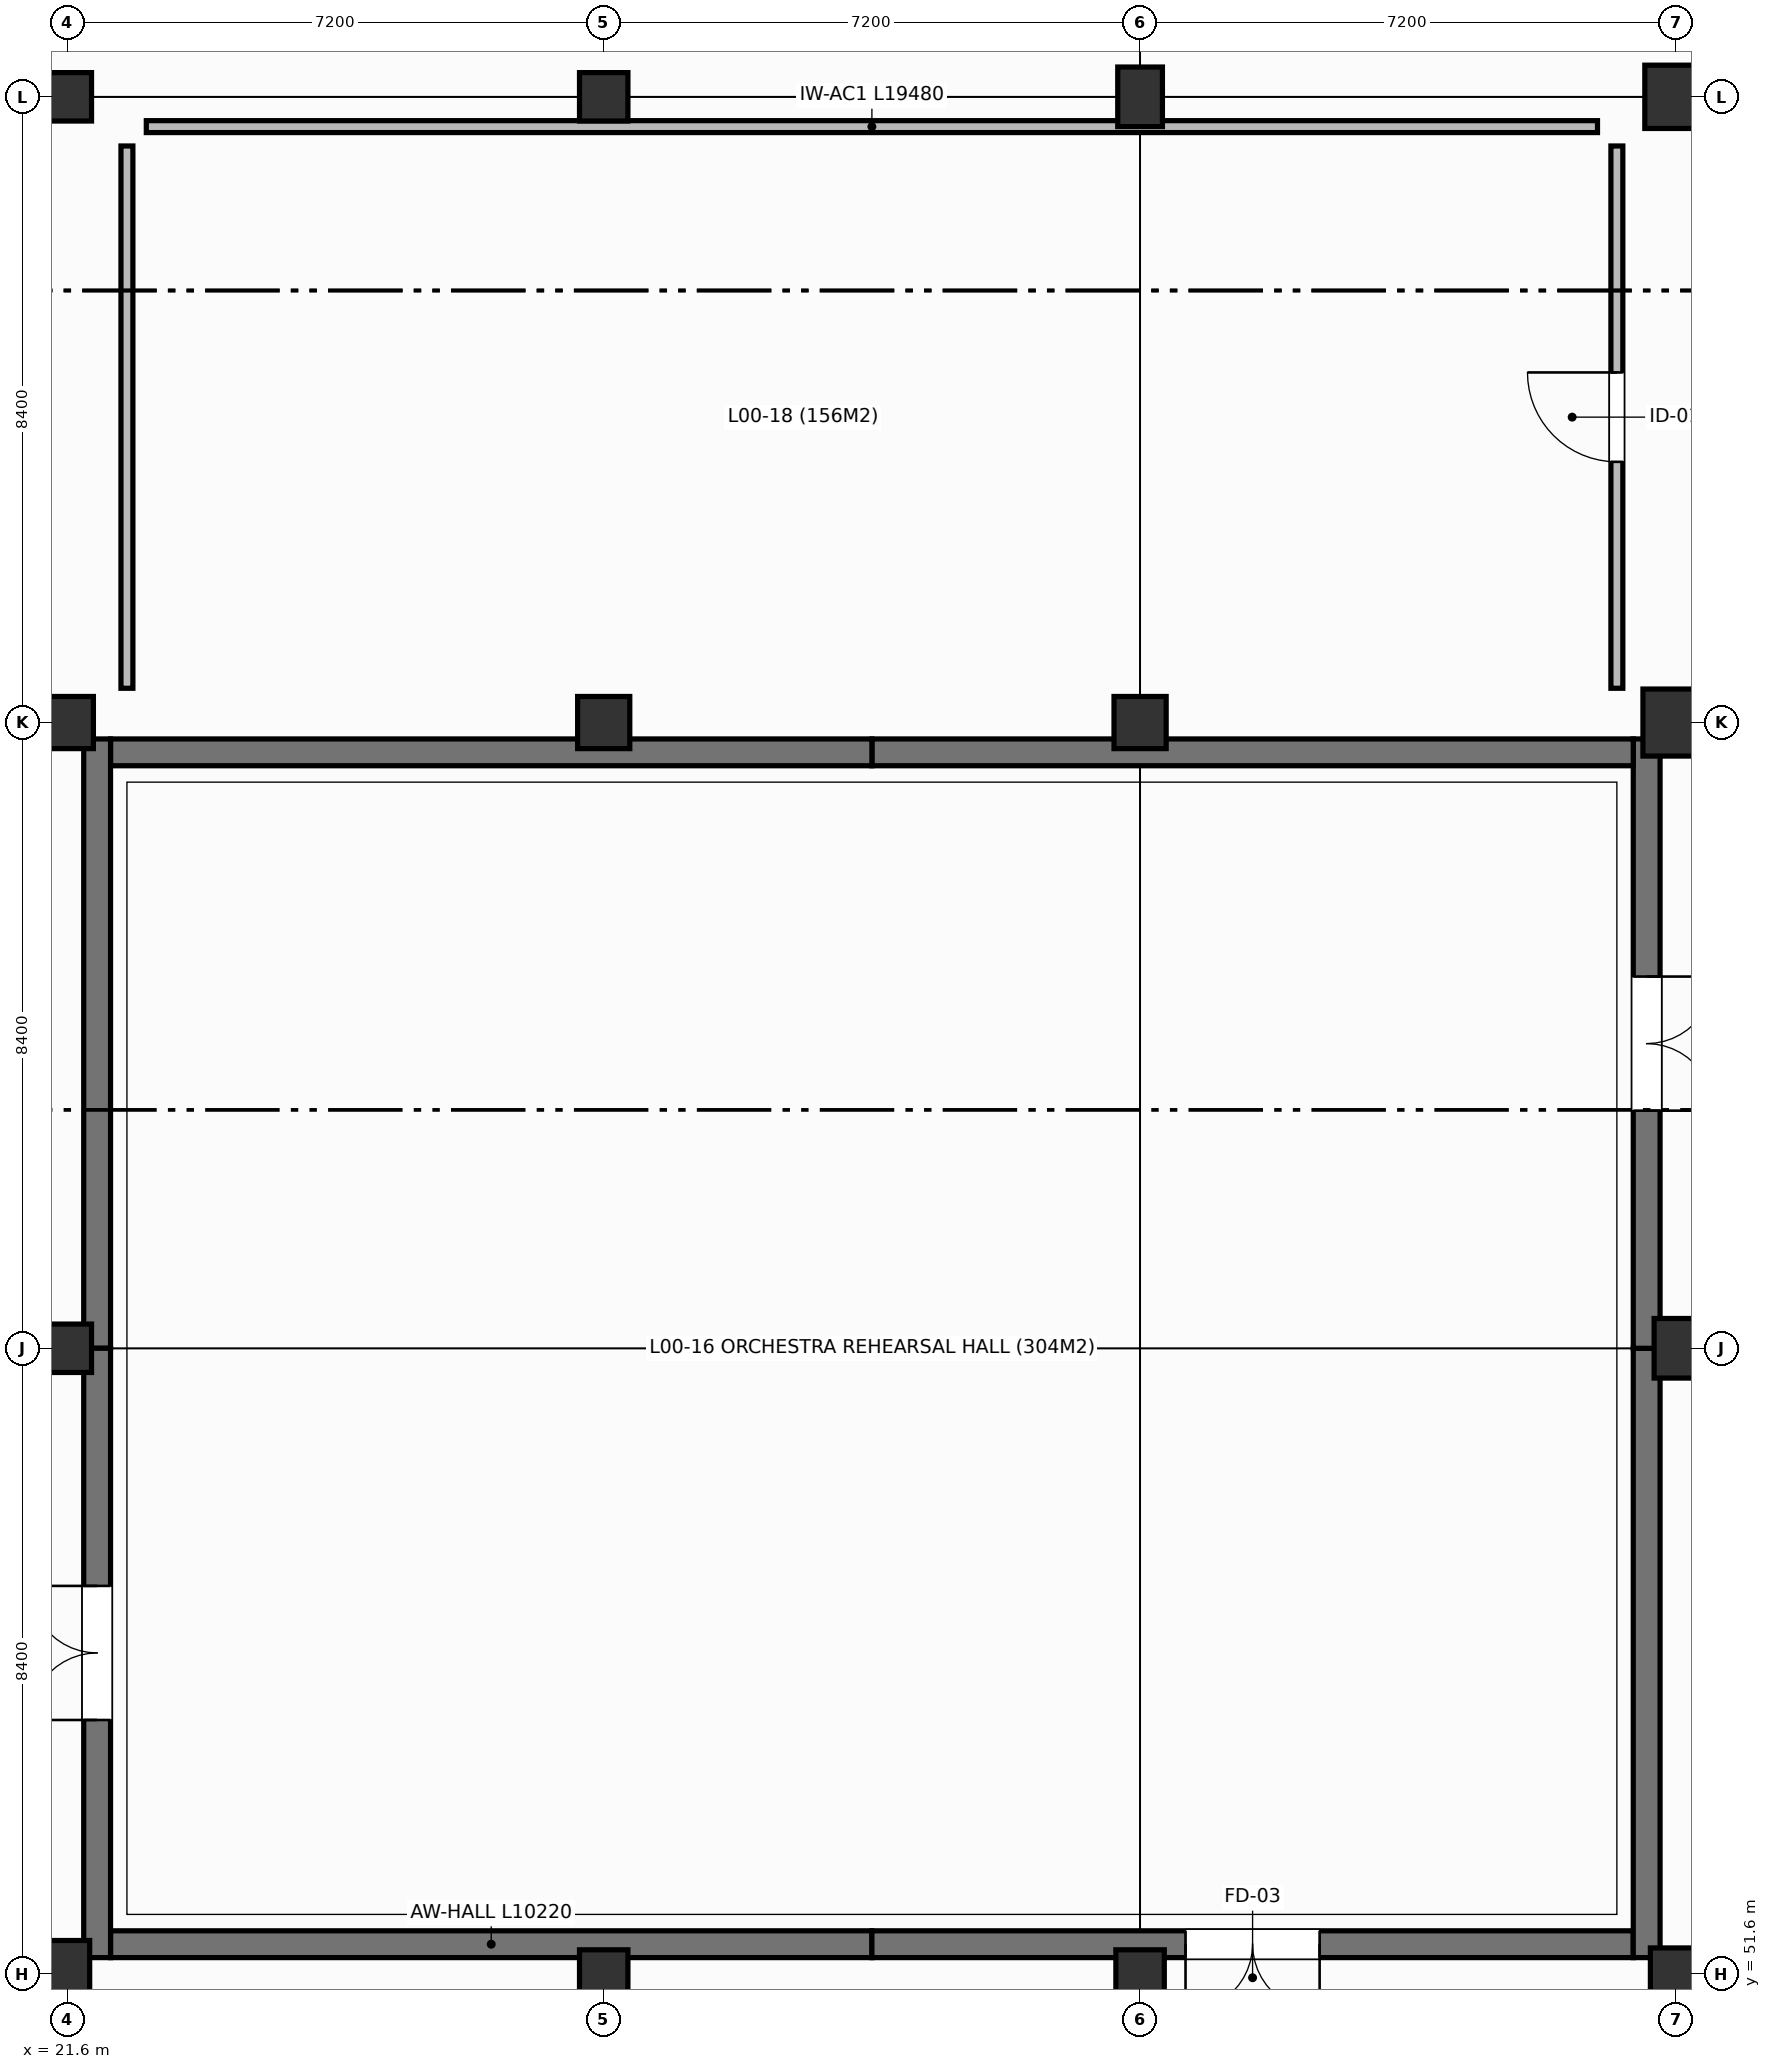
"""IFC4 building model, lengths in metres.
Left out: names, types, materials, properties, quantities, classifications, styles, units other than length and angle.
Written with IfcOpenShell. Run it as: python <this file> out.ifc"""

import sys

from ifc_helpers import new_model, si_unit, direction, frame, frame_2d, origin, origin_2d, place, context, subcontext, project, spatial, rectangle, extrude, element, fill, save


model = new_model("IFC4")
c1 = context("Model", 3, precision=1e-05, world=origin(), true_north=direction((0.0, 1.0)))
c2 = subcontext(c1, "Body", "Model", "MODEL_VIEW")
j1 = project(units=[si_unit("LENGTHUNIT", "METRE"), si_unit("PLANEANGLEUNIT", "RADIAN")], contexts=[c1])
p1 = place(None, origin())
s1 = spatial("IfcSite", under=j1, at=p1, CompositionType="ELEMENT")
p2 = place(p1, origin())
s2 = spatial("IfcBuilding", under=s1, at=p2, CompositionType="ELEMENT")
p3 = place(p2, origin())
s3 = spatial("IfcBuildingStorey", under=s2, at=p3, CompositionType="ELEMENT", Elevation=0.0)
p4 = place(p3, frame((21.6, 51.6, 0.0), z_axis=(0.0, 0.0, 1.0), x_axis=(1.0, 0.0, 0.0)))
e1 = element("IfcColumn", 1, at=p4, inside=s3, PredefinedType="COLUMN", context=c2, shape_type="SweptSolid", body=[
    extrude(rectangle(XDim=0.6, YDim=0.9, at=origin_2d()), origin(), (0.0, 0.0, 1.0), 4.8),
])
p5 = place(p3, frame((21.6, 60.0, 0.0), z_axis=(0.0, 0.0, 1.0), x_axis=(1.0, 0.0, 0.0)))
e2 = element("IfcColumn", 2, at=p5, inside=s3, PredefinedType="COLUMN", context=c2, shape_type="SweptSolid", body=[
    extrude(rectangle(XDim=0.65, YDim=0.65, at=origin_2d()), origin(), (0.0, 0.0, 1.0), 4.8),
])
p6 = place(p3, frame((21.6, 68.4, 0.0), z_axis=(0.0, 0.0, 1.0), x_axis=(1.0, 0.0, 0.0)))
e3 = element("IfcColumn", 3, at=p6, inside=s3, PredefinedType="COLUMN", context=c2, shape_type="SweptSolid", body=[
    extrude(rectangle(XDim=0.7, YDim=0.7, at=origin_2d()), origin(), (0.0, 0.0, 1.0), 4.8),
])
for number, where, z_axis, x_axis in (
    (4, (21.6, 76.8, 0.0), (0.0, 0.0, 1.0), (1.0, 0.0, 0.0)),
    (5, (28.8, 51.6, 0.0), (0.0, 0.0, 1.0), (1.0, 0.0, 0.0)),
):
    element("IfcColumn", number, at=place(p3, frame(where, z_axis=z_axis, x_axis=x_axis)), inside=s3, PredefinedType="COLUMN", context=c2, shape_type="SweptSolid", body=[
        extrude(rectangle(XDim=0.65, YDim=0.65, at=origin_2d()), origin(), (0.0, 0.0, 1.0), 4.8),
    ])
p7 = place(p3, frame((28.8, 68.4, 0.0), z_axis=(0.0, 0.0, 1.0), x_axis=(1.0, 0.0, 0.0)))
e6 = element("IfcColumn", 6, at=p7, inside=s3, PredefinedType="COLUMN", context=c2, shape_type="SweptSolid", body=[
    extrude(rectangle(XDim=0.7, YDim=0.7, at=origin_2d()), origin(), (0.0, 0.0, 1.0), 4.8),
])
for number, where, z_axis, x_axis in (
    (7, (28.8, 76.8, 0.0), (0.0, 0.0, 1.0), (1.0, 0.0, 0.0)),
    (8, (36.0, 51.6, 0.0), (0.0, 0.0, 1.0), (1.0, 0.0, 0.0)),
):
    element("IfcColumn", number, at=place(p3, frame(where, z_axis=z_axis, x_axis=x_axis)), inside=s3, PredefinedType="COLUMN", context=c2, shape_type="SweptSolid", body=[
        extrude(rectangle(XDim=0.65, YDim=0.65, at=origin_2d()), origin(), (0.0, 0.0, 1.0), 4.8),
    ])
p8 = place(p3, frame((36.0, 68.4, 0.0), z_axis=(0.0, 0.0, 1.0), x_axis=(1.0, 0.0, 0.0)))
e9 = element("IfcColumn", 9, at=p8, inside=s3, PredefinedType="COLUMN", context=c2, shape_type="SweptSolid", body=[
    extrude(rectangle(XDim=0.7, YDim=0.7, at=origin_2d()), origin(), (0.0, 0.0, 1.0), 4.8),
])
p9 = place(p3, frame((36.0, 76.8, 0.0), z_axis=(0.0, 0.0, 1.0), x_axis=(1.0, 0.0, 0.0)))
e10 = element("IfcColumn", 10, at=p9, inside=s3, PredefinedType="COLUMN", context=c2, shape_type="SweptSolid", body=[
    extrude(rectangle(XDim=0.6, YDim=0.8, at=origin_2d()), origin(), (0.0, 0.0, 1.0), 4.8),
])
p10 = place(p3, frame((43.2, 51.6, 0.0), z_axis=(0.0, 0.0, 1.0), x_axis=(1.0, 0.0, 0.0)))
e11 = element("IfcColumn", 11, at=p10, inside=s3, PredefinedType="COLUMN", context=c2, shape_type="SweptSolid", body=[
    extrude(rectangle(XDim=0.7, YDim=0.7, at=origin_2d()), origin(), (0.0, 0.0, 1.0), 4.8),
])
p11 = place(p3, frame((43.2, 60.0, 0.0), z_axis=(0.0, 0.0, 1.0), x_axis=(1.0, 0.0, 0.0)))
e12 = element("IfcColumn", 12, at=p11, inside=s3, PredefinedType="COLUMN", context=c2, shape_type="SweptSolid", body=[
    extrude(rectangle(XDim=0.6, YDim=0.8, at=origin_2d()), origin(), (0.0, 0.0, 1.0), 4.8),
])
p12 = place(p3, frame((43.2, 68.4, 0.0), z_axis=(0.0, 0.0, 1.0), x_axis=(1.0, 0.0, 0.0)))
e13 = element("IfcColumn", 13, at=p12, inside=s3, PredefinedType="COLUMN", context=c2, shape_type="SweptSolid", body=[
    extrude(rectangle(XDim=0.9, YDim=0.9, at=origin_2d()), origin(), (0.0, 0.0, 1.0), 4.8),
])
p13 = place(p3, frame((43.2, 76.8, 0.0), z_axis=(0.0, 0.0, 1.0), x_axis=(1.0, 0.0, 0.0)))
e14 = element("IfcColumn", 14, at=p13, inside=s3, PredefinedType="COLUMN", context=c2, shape_type="SweptSolid", body=[
    extrude(rectangle(XDim=0.85, YDim=0.85, at=origin_2d()), origin(), (0.0, 0.0, 1.0), 4.8),
])
p14 = place(p3, frame((22.18, 52.0, 0.0), z_axis=(0.0, 0.0, 1.0), x_axis=(1.0, 0.0, 0.0)))
e15 = element("IfcWall", 15, at=p14, inside=s3, PredefinedType="SHEAR", context=c2, shape_type="SweptSolid", body=[
    extrude(rectangle(XDim=10.22, YDim=0.36, at=frame_2d((5.11, 0.0))), origin(), (0.0, 0.0, 1.0), 4.8),
])
p15 = place(p3, frame((32.4, 52.0, 0.0), z_axis=(0.0, 0.0, 1.0), x_axis=(1.0, 0.0, 0.0)))
e16 = element("IfcWall", 16, at=p15, inside=s3, PredefinedType="SHEAR", context=c2, shape_type="SweptSolid", body=[
    extrude(rectangle(XDim=10.22, YDim=0.36, at=frame_2d((5.11, 0.0))), origin(), (0.0, 0.0, 1.0), 4.8),
])
p16 = place(p15, frame((4.21, 0.0, 0.0)))
e17 = element("IfcOpeningElement", 17, at=p16, cuts=e16, PredefinedType="OPENING", context=c2, shape_type="SweptSolid", body=[
    extrude(rectangle(XDim=1.8, YDim=2.25, at=frame_2d((0.9, 1.125))), frame((0.0, 0.19, 0.0), z_axis=(0.0, -1.0, 0.0), x_axis=(1.0, 0.0, 0.0)), (0.0, 0.0, 1.0), 0.38),
])
p17 = place(p3, frame((42.8, 51.82, 0.0), z_axis=(0.0, 0.0, 1.0), x_axis=(0.0, 1.0, 0.0)))
e18 = element("IfcWall", 18, at=p17, inside=s3, PredefinedType="SHEAR", context=c2, shape_type="SweptSolid", body=[
    extrude(rectangle(XDim=8.18, YDim=0.36, at=frame_2d((4.09, 0.0))), origin(), (0.0, 0.0, 1.0), 4.8),
])
p18 = place(p3, frame((42.8, 60.0, 0.0), z_axis=(0.0, 0.0, 1.0), x_axis=(0.0, 1.0, 0.0)))
e19 = element("IfcWall", 19, at=p18, inside=s3, PredefinedType="SHEAR", context=c2, shape_type="SweptSolid", body=[
    extrude(rectangle(XDim=8.18, YDim=0.36, at=frame_2d((4.09, 0.0))), origin(), (0.0, 0.0, 1.0), 4.8),
])
p19 = place(p18, frame((3.19, 0.0, 0.0)))
e20 = element("IfcOpeningElement", 20, at=p19, cuts=e19, PredefinedType="OPENING", context=c2, shape_type="SweptSolid", body=[
    extrude(rectangle(XDim=1.8, YDim=2.25, at=frame_2d((0.9, 1.125))), frame((0.0, 0.19, 0.0), z_axis=(0.0, -1.0, 0.0), x_axis=(1.0, 0.0, 0.0)), (0.0, 0.0, 1.0), 0.38),
])
p20 = place(p3, frame((42.62, 68.0, 0.0), z_axis=(0.0, 0.0, 1.0), x_axis=(-1.0, 0.0, 0.0)))
e21 = element("IfcWall", 21, at=p20, inside=s3, PredefinedType="SHEAR", context=c2, shape_type="SweptSolid", body=[
    extrude(rectangle(XDim=10.22, YDim=0.36, at=frame_2d((5.11, 0.0))), origin(), (0.0, 0.0, 1.0), 4.8),
])
p21 = place(p3, frame((32.4, 68.0, 0.0), z_axis=(0.0, 0.0, 1.0), x_axis=(-1.0, 0.0, 0.0)))
e22 = element("IfcWall", 22, at=p21, inside=s3, PredefinedType="SHEAR", context=c2, shape_type="SweptSolid", body=[
    extrude(rectangle(XDim=10.22, YDim=0.36, at=frame_2d((5.11, 0.0))), origin(), (0.0, 0.0, 1.0), 4.8),
])
p22 = place(p3, frame((22.0, 68.18, 0.0), z_axis=(0.0, 0.0, 1.0), x_axis=(0.0, -1.0, 0.0)))
e23 = element("IfcWall", 23, at=p22, inside=s3, PredefinedType="SHEAR", context=c2, shape_type="SweptSolid", body=[
    extrude(rectangle(XDim=8.18, YDim=0.36, at=frame_2d((4.09, 0.0))), origin(), (0.0, 0.0, 1.0), 4.8),
])
p23 = place(p3, frame((22.0, 60.0, 0.0), z_axis=(0.0, 0.0, 1.0), x_axis=(0.0, -1.0, 0.0)))
e24 = element("IfcWall", 24, at=p23, inside=s3, PredefinedType="SHEAR", context=c2, shape_type="SweptSolid", body=[
    extrude(rectangle(XDim=8.18, YDim=0.36, at=frame_2d((4.09, 0.0))), origin(), (0.0, 0.0, 1.0), 4.8),
])
p24 = place(p23, frame((3.19, 0.0, 0.0)))
e25 = element("IfcOpeningElement", 25, at=p24, cuts=e24, PredefinedType="OPENING", context=c2, shape_type="SweptSolid", body=[
    extrude(rectangle(XDim=1.8, YDim=2.25, at=frame_2d((0.9, 1.125))), frame((0.0, 0.19, 0.0), z_axis=(0.0, -1.0, 0.0), x_axis=(1.0, 0.0, 0.0)), (0.0, 0.0, 1.0), 0.38),
])
p25 = place(p3, frame((42.4, 68.86, 0.0), z_axis=(0.0, 0.0, 1.0), x_axis=(0.0, 1.0, 0.0)))
e26 = element("IfcWall", 26, at=p25, inside=s3, PredefinedType="PARTITIONING", context=c2, shape_type="SweptSolid", body=[
    extrude(rectangle(XDim=7.28, YDim=0.16, at=frame_2d((3.64, 0.0))), origin(), (0.0, 0.0, 1.0), 4.44),
])
p26 = place(p25, frame((3.04, 0.0, 0.0)))
e27 = element("IfcOpeningElement", 27, at=p26, cuts=e26, PredefinedType="OPENING", context=c2, shape_type="SweptSolid", body=[
    extrude(rectangle(XDim=1.2, YDim=2.15, at=frame_2d((0.6, 1.075))), frame((0.0, 0.09, 0.0), z_axis=(0.0, -1.0, 0.0), x_axis=(1.0, 0.0, 0.0)), (0.0, 0.0, 1.0), 0.18),
])
p27 = place(p3, frame((42.14, 76.4, 0.0), z_axis=(0.0, 0.0, 1.0), x_axis=(-1.0, 0.0, 0.0)))
e28 = element("IfcWall", 28, at=p27, inside=s3, PredefinedType="PARTITIONING", context=c2, shape_type="SweptSolid", body=[
    extrude(rectangle(XDim=19.48, YDim=0.16, at=frame_2d((9.74, 0.0))), origin(), (0.0, 0.0, 1.0), 3.615),
])
p28 = place(p3, frame((22.4, 76.14, 0.0), z_axis=(0.0, 0.0, 1.0), x_axis=(0.0, -1.0, 0.0)))
e29 = element("IfcWall", 29, at=p28, inside=s3, PredefinedType="PARTITIONING", context=c2, shape_type="SweptSolid", body=[
    extrude(rectangle(XDim=7.28, YDim=0.16, at=frame_2d((3.64, 0.0))), origin(), (0.0, 0.0, 1.0), 4.44),
])
p29 = place(p16, frame((1.8, 0.0, 0.0), z_axis=(0.0, 0.0, 1.0), x_axis=(-1.0, 0.0, 0.0)))
e30 = element("IfcDoor", 30, at=p29, inside=s3, OperationType="DOUBLE_DOOR_SINGLE_SWING", PredefinedType="DOOR", context=c2, shape_type="SweptSolid", body=[
    extrude(rectangle(XDim=1.8, YDim=2.25, at=frame_2d((0.9, 1.125))), frame((0.0, 0.025, 0.0), z_axis=(0.0, -1.0, 0.0), x_axis=(1.0, 0.0, 0.0)), (0.0, 0.0, 1.0), 0.05),
])
fill(e17, e30)
p30 = place(p19, frame((1.8, 0.0, 0.0), z_axis=(0.0, 0.0, 1.0), x_axis=(-1.0, 0.0, 0.0)))
e31 = element("IfcDoor", 31, at=p30, inside=s3, OperationType="DOUBLE_DOOR_SINGLE_SWING", PredefinedType="DOOR", context=c2, shape_type="SweptSolid", body=[
    extrude(rectangle(XDim=1.8, YDim=2.25, at=frame_2d((0.9, 1.125))), frame((0.0, 0.025, 0.0), z_axis=(0.0, -1.0, 0.0), x_axis=(1.0, 0.0, 0.0)), (0.0, 0.0, 1.0), 0.05),
])
fill(e20, e31)
p31 = place(p24, frame((1.8, 0.0, 0.0), z_axis=(0.0, 0.0, 1.0), x_axis=(-1.0, 0.0, 0.0)))
e32 = element("IfcDoor", 32, at=p31, inside=s3, OperationType="DOUBLE_DOOR_SINGLE_SWING", PredefinedType="DOOR", context=c2, shape_type="SweptSolid", body=[
    extrude(rectangle(XDim=1.8, YDim=2.25, at=frame_2d((0.9, 1.125))), frame((0.0, 0.025, 0.0), z_axis=(0.0, -1.0, 0.0), x_axis=(1.0, 0.0, 0.0)), (0.0, 0.0, 1.0), 0.05),
])
fill(e25, e32)
p32 = place(p26, origin())
e33 = element("IfcDoor", 33, at=p32, inside=s3, OperationType="SINGLE_SWING_RIGHT", PredefinedType="DOOR", context=c2, shape_type="SweptSolid", body=[
    extrude(rectangle(XDim=1.2, YDim=2.15, at=frame_2d((0.6, 1.075))), frame((0.0, 0.025, 0.0), z_axis=(0.0, -1.0, 0.0), x_axis=(1.0, 0.0, 0.0)), (0.0, 0.0, 1.0), 0.05),
])
fill(e27, e33)
save(model, sys.argv[1])
